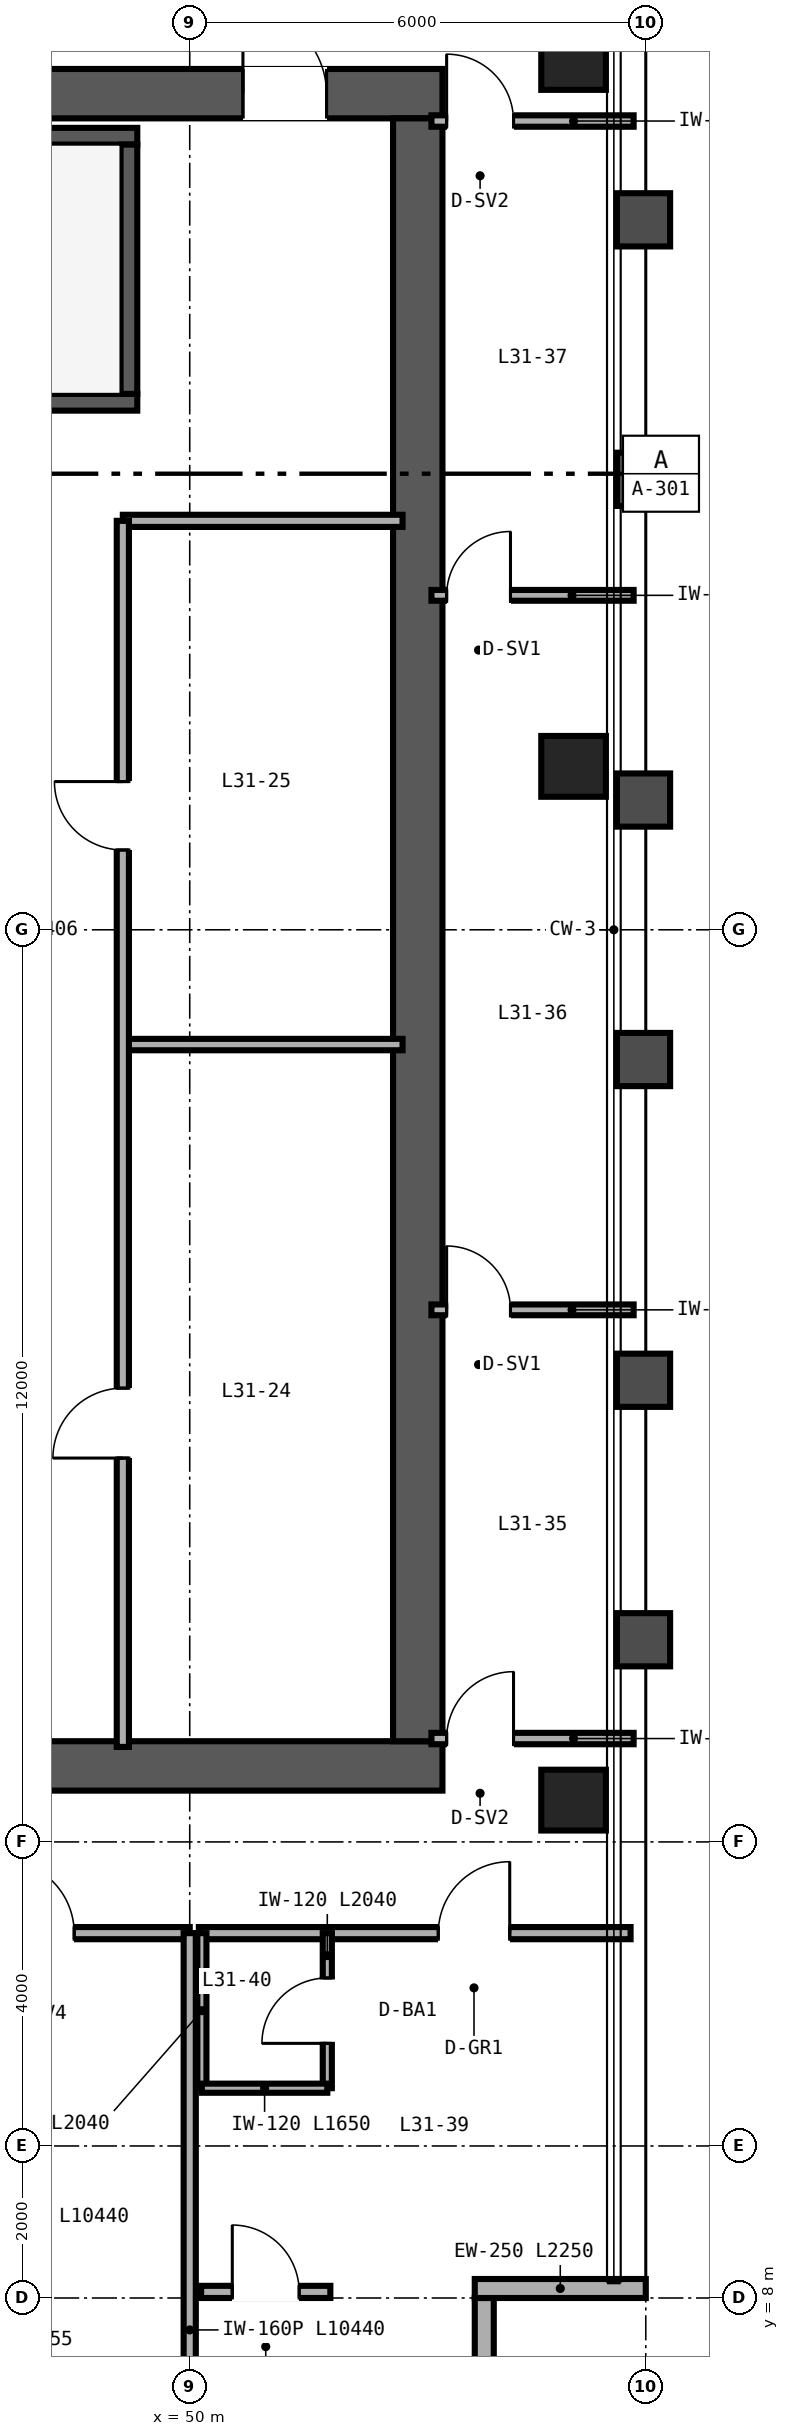
"""IFC4 building model, lengths in metres.
Left out: names, types, materials, properties, quantities, classifications, styles, units other than length and angle.
Written with IfcOpenShell. Run it as: python <this file> out.ifc"""

import sys

from ifc_helpers import new_model, si_unit, direction, frame, frame_2d, origin, origin_2d, place, context, subcontext, project, spatial, rectangle, hollow_rectangle, extrude, source, transform, mapped, element, fill, save


model = new_model("IFC4")
c1 = context("Model", 3, precision=1e-05, world=origin(), true_north=direction((0.0, 1.0)))
c2 = subcontext(c1, "Body", "Model", "MODEL_VIEW")
j1 = project(units=[si_unit("LENGTHUNIT", "METRE"), si_unit("PLANEANGLEUNIT", "RADIAN")], contexts=[c1])
p1 = place(None, origin())
s1 = spatial("IfcSite", under=j1, at=p1, CompositionType="ELEMENT")
p2 = place(p1, origin())
s2 = spatial("IfcBuilding", under=s1, at=p2, CompositionType="ELEMENT")
p3 = place(p2, frame((0.0, 0.0, 126.0)))
s3 = spatial("IfcBuildingStorey", under=s2, at=p3, CompositionType="ELEMENT", Elevation=126.0)
p4 = place(p3, frame((40.675, 15.0, 0.0), z_axis=(0.0, 0.0, 1.0), x_axis=(1.0, 0.0, 0.0)))
e1 = element("IfcWall", 1, at=p4, inside=s3, PredefinedType="SHEAR", context=c2, shape_type="SweptSolid", body=[
    extrude(rectangle(XDim=12.65, YDim=0.65, at=frame_2d((6.325, 0.0))), origin(), (0.0, 0.0, 1.0), 3.36),
])
p5 = place(p4, frame((4.425, 0.0, 0.0)))
e2 = element("IfcOpeningElement", 2, at=p5, cuts=e1, PredefinedType="OPENING", context=c2, shape_type="SweptSolid", body=[
    extrude(rectangle(XDim=1.0, YDim=2.15, at=frame_2d((0.5, 1.075))), frame((0.0, 0.335, 0.0), z_axis=(0.0, -1.0, 0.0), x_axis=(1.0, 0.0, 0.0)), (0.0, 0.0, 1.0), 0.67),
])
p6 = place(p3, frame((40.675, 37.0, 0.0), z_axis=(0.0, 0.0, 1.0), x_axis=(1.0, 0.0, 0.0)))
e3 = element("IfcWall", 3, at=p6, inside=s3, PredefinedType="SHEAR", context=c2, shape_type="SweptSolid", body=[
    extrude(rectangle(XDim=12.65, YDim=0.65, at=frame_2d((6.325, 0.0))), origin(), (0.0, 0.0, 1.0), 3.36),
])
p7 = place(p6, frame((10.025, 0.0, 0.0)))
e4 = element("IfcOpeningElement", 4, at=p7, cuts=e3, PredefinedType="OPENING", context=c2, shape_type="SweptSolid", body=[
    extrude(rectangle(XDim=1.1, YDim=2.15, at=frame_2d((0.55, 1.075))), frame((0.0, 0.335, 0.0), z_axis=(0.0, -1.0, 0.0), x_axis=(1.0, 0.0, 0.0)), (0.0, 0.0, 1.0), 0.67),
])
p8 = place(p3, frame((53.0, 15.325, 0.0), z_axis=(0.0, 0.0, 1.0), x_axis=(0.0, 1.0, 0.0)))
e5 = element("IfcWall", 5, at=p8, inside=s3, PredefinedType="SHEAR", context=c2, shape_type="SweptSolid", body=[
    extrude(rectangle(XDim=21.35, YDim=0.65, at=frame_2d((10.675, 0.0))), origin(), (0.0, 0.0, 1.0), 3.36),
])
p9 = place(p3, frame((41.325, 32.94, 0.0), z_axis=(0.0, 0.0, 1.0), x_axis=(1.0, 0.0, 0.0)))
e6 = element("IfcWall", 6, at=p9, inside=s3, PredefinedType="SHEAR", context=c2, shape_type="SweptSolid", body=[
    extrude(rectangle(XDim=7.985, YDim=0.22, at=frame_2d((3.993, 0.0))), origin(), (0.0, 0.0, 1.0), 3.4),
])
p10 = place(p9, frame((0.595, 0.0, 0.0)))
e7 = element("IfcOpeningElement", 7, at=p10, cuts=e6, PredefinedType="OPENING", context=c2, shape_type="SweptSolid", body=[
    extrude(rectangle(XDim=1.05, YDim=2.15, at=frame_2d((0.525, 1.075))), frame((0.0, 0.12, 0.0), z_axis=(0.0, -1.0, 0.0), x_axis=(1.0, 0.0, 0.0)), (0.0, 0.0, 1.0), 0.24),
])
p11 = place(p3, frame((41.325, 36.44, 0.0), z_axis=(0.0, 0.0, 1.0), x_axis=(1.0, 0.0, 0.0)))
e8 = element("IfcWall", 8, at=p11, inside=s3, PredefinedType="SHEAR", context=c2, shape_type="SweptSolid", body=[
    extrude(rectangle(XDim=7.985, YDim=0.22, at=frame_2d((3.993, 0.0))), origin(), (0.0, 0.0, 1.0), 3.4),
])
p12 = place(p3, frame((49.2, 33.05, 0.0), z_axis=(0.0, 0.0, 1.0), x_axis=(0.0, 1.0, 0.0)))
e9 = element("IfcWall", 9, at=p12, inside=s3, PredefinedType="SHEAR", context=c2, shape_type="SweptSolid", body=[
    extrude(rectangle(XDim=3.28, YDim=0.22, at=frame_2d((1.64, 0.0))), origin(), (0.0, 0.0, 1.0), 3.4),
])
m1 = source(origin(), c2, "Body", "SweptSolid", [
    extrude(hollow_rectangle(XDim=0.85, YDim=0.8, WallThickness=0.032, at=origin_2d()), origin(), (0.0, 0.0, 1.0), 3.36),
])
for number, where, z_axis, x_axis in (
    (10, (55.05, 14.55, 0.0), (0.0, 0.0, 1.0), (1.0, 0.0, 0.0)),
    (11, (55.05, 28.15, 0.0), (0.0, 0.0, 1.0), (1.0, 0.0, 0.0)),
    (12, (55.05, 37.45, 0.0), (0.0, 0.0, 1.0), (1.0, 0.0, 0.0)),
):
    element("IfcColumn", number, at=place(p3, frame(where, z_axis=z_axis, x_axis=x_axis)), inside=s3, PredefinedType="COLUMN", context=c2, shape_type="MappedRepresentation", body=[
        mapped(m1, transform((0.0, 0.0, 0.0), scale=1.0)),
    ])
p13 = place(p3, frame((53.875, 6.0, 0.0), z_axis=(0.0, 0.0, 1.0), x_axis=(0.0, 1.0, 0.0)))
e13 = element("IfcWall", 13, at=p13, inside=s3, PredefinedType="SOLIDWALL", context=c2, shape_type="SweptSolid", body=[
    extrude(rectangle(XDim=2.0, YDim=0.25, at=frame_2d((1.0, 0.0))), origin(), (0.0, 0.0, 1.0), 3.36),
])
p14 = place(p3, frame((53.75, 8.125, 0.0), z_axis=(0.0, 0.0, 1.0), x_axis=(1.0, 0.0, 0.0)))
e14 = element("IfcWall", 14, at=p14, inside=s3, PredefinedType="SOLIDWALL", context=c2, shape_type="SweptSolid", body=[
    extrude(rectangle(XDim=2.25, YDim=0.25, at=frame_2d((1.125, 0.0))), origin(), (0.0, 0.0, 1.0), 3.36),
])
p15 = place(p3, frame((49.12, 31.38, 0.0), z_axis=(0.0, 0.0, 1.0), x_axis=(1.0, 0.0, 0.0)))
e15 = element("IfcWall", 15, at=p15, inside=s3, PredefinedType="PARTITIONING", context=c2, shape_type="SweptSolid", body=[
    extrude(rectangle(XDim=3.68, YDim=0.16, at=frame_2d((1.84, 0.0))), origin(), (0.0, 0.0, 1.0), 2.36),
])
p16 = place(p3, frame((49.12, 24.49, 0.0), z_axis=(0.0, 0.0, 1.0), x_axis=(1.0, 0.0, 0.0)))
e16 = element("IfcWall", 16, at=p16, inside=s3, PredefinedType="PARTITIONING", context=c2, shape_type="SweptSolid", body=[
    extrude(rectangle(XDim=3.68, YDim=0.15, at=frame_2d((1.84, 0.0))), origin(), (0.0, 0.0, 1.0), 3.36),
])
p17 = place(p3, frame((49.12, 15.25, 0.0), z_axis=(0.0, 0.0, 1.0), x_axis=(0.0, 1.0, 0.0)))
e17 = element("IfcWall", 17, at=p17, inside=s3, PredefinedType="PARTITIONING", context=c2, shape_type="SweptSolid", body=[
    extrude(rectangle(XDim=16.13, YDim=0.16, at=frame_2d((8.065, 0.0))), origin(), (0.0, 0.0, 1.0), 2.36),
])
p18 = place(p17, frame((3.8, 0.0, 0.0)))
e18 = element("IfcOpeningElement", 18, at=p18, cuts=e17, PredefinedType="OPENING", context=c2, shape_type="SweptSolid", body=[
    extrude(rectangle(XDim=0.92, YDim=2.15, at=frame_2d((0.46, 1.075))), frame((0.0, 0.09, 0.0), z_axis=(0.0, -1.0, 0.0), x_axis=(1.0, 0.0, 0.0)), (0.0, 0.0, 1.0), 0.18),
])
p19 = place(p17, frame((11.8, 0.0, 0.0)))
e19 = element("IfcOpeningElement", 19, at=p19, cuts=e17, PredefinedType="OPENING", context=c2, shape_type="SweptSolid", body=[
    extrude(rectangle(XDim=0.9, YDim=2.15, at=frame_2d((0.45, 1.075))), frame((0.0, 0.09, 0.0), z_axis=(0.0, -1.0, 0.0), x_axis=(1.0, 0.0, 0.0)), (0.0, 0.0, 1.0), 0.18),
])
p20 = place(p3, frame((53.18, 15.36, 0.0), z_axis=(0.0, 0.0, 1.0), x_axis=(1.0, 0.0, 0.0)))
e20 = element("IfcWall", 20, at=p20, inside=s3, PredefinedType="PARTITIONING", context=c2, shape_type="SweptSolid", body=[
    extrude(rectangle(XDim=2.66, YDim=0.15, at=frame_2d((1.33, 0.0))), origin(), (0.0, 0.0, 1.0), 2.581),
])
p21 = place(p20, frame((0.2, 0.0, 0.0)))
e21 = element("IfcOpeningElement", 21, at=p21, cuts=e20, PredefinedType="OPENING", context=c2, shape_type="SweptSolid", body=[
    extrude(rectangle(XDim=0.88, YDim=2.15, at=frame_2d((0.44, 1.075))), frame((0.0, 0.085, 0.0), z_axis=(0.0, -1.0, 0.0), x_axis=(1.0, 0.0, 0.0)), (0.0, 0.0, 1.0), 0.17),
])
p22 = place(p3, frame((53.18, 36.64, 0.0), z_axis=(0.0, 0.0, 1.0), x_axis=(1.0, 0.0, 0.0)))
e22 = element("IfcWall", 22, at=p22, inside=s3, PredefinedType="PARTITIONING", context=c2, shape_type="SweptSolid", body=[
    extrude(rectangle(XDim=2.66, YDim=0.15, at=frame_2d((1.33, 0.0))), origin(), (0.0, 0.0, 1.0), 2.743),
])
p23 = place(p22, frame((0.2, 0.0, 0.0)))
e23 = element("IfcOpeningElement", 23, at=p23, cuts=e22, PredefinedType="OPENING", context=c2, shape_type="SweptSolid", body=[
    extrude(rectangle(XDim=0.88, YDim=2.15, at=frame_2d((0.44, 1.075))), frame((0.0, 0.085, 0.0), z_axis=(0.0, -1.0, 0.0), x_axis=(1.0, 0.0, 0.0)), (0.0, 0.0, 1.0), 0.17),
])
p24 = place(p3, frame((53.18, 21.0, 0.0), z_axis=(0.0, 0.0, 1.0), x_axis=(1.0, 0.0, 0.0)))
e24 = element("IfcWall", 24, at=p24, inside=s3, PredefinedType="PARTITIONING", context=c2, shape_type="SweptSolid", body=[
    extrude(rectangle(XDim=2.66, YDim=0.142, at=frame_2d((1.33, 0.0))), origin(), (0.0, 0.0, 1.0), 2.581),
])
p25 = place(p24, frame((0.2, 0.0, 0.0)))
e25 = element("IfcOpeningElement", 25, at=p25, cuts=e24, PredefinedType="OPENING", context=c2, shape_type="SweptSolid", body=[
    extrude(rectangle(XDim=0.84, YDim=2.1, at=frame_2d((0.42, 1.05))), frame((0.0, 0.081, 0.0), z_axis=(0.0, -1.0, 0.0), x_axis=(1.0, 0.0, 0.0)), (0.0, 0.0, 1.0), 0.162),
])
p26 = place(p3, frame((53.18, 30.4, 0.0), z_axis=(0.0, 0.0, 1.0), x_axis=(1.0, 0.0, 0.0)))
e26 = element("IfcWall", 26, at=p26, inside=s3, PredefinedType="PARTITIONING", context=c2, shape_type="SweptSolid", body=[
    extrude(rectangle(XDim=2.66, YDim=0.142, at=frame_2d((1.33, 0.0))), origin(), (0.0, 0.0, 1.0), 2.743),
])
p27 = place(p26, frame((0.2, 0.0, 0.0)))
e27 = element("IfcOpeningElement", 27, at=p27, cuts=e26, PredefinedType="OPENING", context=c2, shape_type="SweptSolid", body=[
    extrude(rectangle(XDim=0.84, YDim=2.1, at=frame_2d((0.42, 1.05))), frame((0.0, 0.081, 0.0), z_axis=(0.0, -1.0, 0.0), x_axis=(1.0, 0.0, 0.0)), (0.0, 0.0, 1.0), 0.162),
])
p28 = place(p3, frame((50.12, 12.8, 0.0), z_axis=(0.0, 0.0, 1.0), x_axis=(1.0, 0.0, 0.0)))
e28 = element("IfcWall", 28, at=p28, inside=s3, PredefinedType="PARTITIONING", context=c2, shape_type="SweptSolid", body=[
    extrude(rectangle(XDim=5.68, YDim=0.16, at=frame_2d((2.84, 0.0))), origin(), (0.0, 0.0, 1.0), 3.36),
])
p29 = place(p28, frame((3.15, 0.0, 0.0)))
e29 = element("IfcOpeningElement", 29, at=p29, cuts=e28, PredefinedType="OPENING", context=c2, shape_type="SweptSolid", body=[
    extrude(rectangle(XDim=0.94, YDim=2.15, at=frame_2d((0.47, 1.075))), frame((0.0, 0.09, 0.0), z_axis=(0.0, -1.0, 0.0), x_axis=(1.0, 0.0, 0.0)), (0.0, 0.0, 1.0), 0.18),
])
p30 = place(p3, frame((51.81, 10.76, 0.0), z_axis=(0.0, 0.0, 1.0), x_axis=(0.0, 1.0, 0.0)))
e30 = element("IfcWall", 30, at=p30, inside=s3, PredefinedType="PARTITIONING", context=c2, shape_type="SweptSolid", body=[
    extrude(rectangle(XDim=2.04, YDim=0.12, at=frame_2d((1.02, 0.0))), origin(), (0.0, 0.0, 1.0), 3.36),
])
p31 = place(p30, frame((0.59, 0.0, 0.0)))
e31 = element("IfcOpeningElement", 31, at=p31, cuts=e30, PredefinedType="OPENING", context=c2, shape_type="SweptSolid", body=[
    extrude(rectangle(XDim=0.86, YDim=2.1, at=frame_2d((0.43, 1.05))), frame((0.0, 0.07, 0.0), z_axis=(0.0, -1.0, 0.0), x_axis=(1.0, 0.0, 0.0)), (0.0, 0.0, 1.0), 0.14),
])
p32 = place(p3, frame((50.16, 10.76, 0.0), z_axis=(0.0, 0.0, 1.0), x_axis=(0.0, 1.0, 0.0)))
e32 = element("IfcWall", 32, at=p32, inside=s3, PredefinedType="PARTITIONING", context=c2, shape_type="SweptSolid", body=[
    extrude(rectangle(XDim=2.04, YDim=0.12, at=frame_2d((1.02, 0.0))), origin(), (0.0, 0.0, 1.0), 3.36),
])
p33 = place(p3, frame((50.16, 10.76, 0.0), z_axis=(0.0, 0.0, 1.0), x_axis=(1.0, 0.0, 0.0)))
e33 = element("IfcWall", 33, at=p33, inside=s3, PredefinedType="PARTITIONING", context=c2, shape_type="SweptSolid", body=[
    extrude(rectangle(XDim=1.65, YDim=0.12, at=frame_2d((0.825, 0.0))), origin(), (0.0, 0.0, 1.0), 3.36),
])
p34 = place(p3, frame((50.15, 8.08, 0.0), z_axis=(0.0, 0.0, 1.0), x_axis=(1.0, 0.0, 0.0)))
e34 = element("IfcWall", 34, at=p34, inside=s3, PredefinedType="PARTITIONING", context=c2, shape_type="SweptSolid", body=[
    extrude(rectangle(XDim=1.7, YDim=0.16, at=frame_2d((0.85, 0.0))), origin(), (0.0, 0.0, 1.0), 3.36),
])
p35 = place(p34, frame((0.41, 0.0, 0.0)))
e35 = element("IfcOpeningElement", 35, at=p35, cuts=e34, PredefinedType="OPENING", context=c2, shape_type="SweptSolid", body=[
    extrude(rectangle(XDim=0.88, YDim=2.15, at=frame_2d((0.44, 1.075))), frame((0.0, 0.09, 0.0), z_axis=(0.0, -1.0, 0.0), x_axis=(1.0, 0.0, 0.0)), (0.0, 0.0, 1.0), 0.18),
])
p36 = place(p3, frame((14.0, 12.8, 0.0), z_axis=(0.0, 0.0, 1.0), x_axis=(1.0, 0.0, 0.0)))
e36 = element("IfcWall", 36, at=p36, inside=s3, PredefinedType="PARTITIONING", context=c2, shape_type="SweptSolid", body=[
    extrude(rectangle(XDim=36.0, YDim=0.16, at=frame_2d((18.0, 0.0))), origin(), (0.0, 0.0, 1.0), 2.581),
])
p37 = place(p36, frame((4.14, 0.0, 0.0)))
e37 = element("IfcOpeningElement", 37, at=p37, cuts=e36, PredefinedType="OPENING", context=c2, shape_type="SweptSolid", body=[
    extrude(rectangle(XDim=0.94, YDim=2.15, at=frame_2d((0.47, 1.075))), frame((0.0, 0.09, 0.0), z_axis=(0.0, -1.0, 0.0), x_axis=(1.0, 0.0, 0.0)), (0.0, 0.0, 1.0), 0.18),
])
p38 = place(p36, frame((9.54, 0.0, 0.0)))
e38 = element("IfcOpeningElement", 38, at=p38, cuts=e36, PredefinedType="OPENING", context=c2, shape_type="SweptSolid", body=[
    extrude(rectangle(XDim=0.94, YDim=2.15, at=frame_2d((0.47, 1.075))), frame((0.0, 0.09, 0.0), z_axis=(0.0, -1.0, 0.0), x_axis=(1.0, 0.0, 0.0)), (0.0, 0.0, 1.0), 0.18),
])
p39 = place(p36, frame((13.22, 0.0, 0.0)))
e39 = element("IfcOpeningElement", 39, at=p39, cuts=e36, PredefinedType="OPENING", context=c2, shape_type="SweptSolid", body=[
    extrude(rectangle(XDim=0.96, YDim=2.15, at=frame_2d((0.48, 1.075))), frame((0.0, 0.09, 0.0), z_axis=(0.0, -1.0, 0.0), x_axis=(1.0, 0.0, 0.0)), (0.0, 0.0, 1.0), 0.18),
])
p40 = place(p36, frame((19.02, 0.0, 0.0)))
e40 = element("IfcOpeningElement", 40, at=p40, cuts=e36, PredefinedType="OPENING", context=c2, shape_type="SweptSolid", body=[
    extrude(rectangle(XDim=0.96, YDim=2.15, at=frame_2d((0.48, 1.075))), frame((0.0, 0.09, 0.0), z_axis=(0.0, -1.0, 0.0), x_axis=(1.0, 0.0, 0.0)), (0.0, 0.0, 1.0), 0.18),
])
p41 = place(p36, frame((24.62, 0.0, 0.0)))
e41 = element("IfcOpeningElement", 41, at=p41, cuts=e36, PredefinedType="OPENING", context=c2, shape_type="SweptSolid", body=[
    extrude(rectangle(XDim=0.96, YDim=2.15, at=frame_2d((0.48, 1.075))), frame((0.0, 0.09, 0.0), z_axis=(0.0, -1.0, 0.0), x_axis=(1.0, 0.0, 0.0)), (0.0, 0.0, 1.0), 0.18),
])
p42 = place(p36, frame((30.74, 0.0, 0.0)))
e42 = element("IfcOpeningElement", 42, at=p42, cuts=e36, PredefinedType="OPENING", context=c2, shape_type="SweptSolid", body=[
    extrude(rectangle(XDim=0.94, YDim=2.15, at=frame_2d((0.47, 1.075))), frame((0.0, 0.09, 0.0), z_axis=(0.0, -1.0, 0.0), x_axis=(1.0, 0.0, 0.0)), (0.0, 0.0, 1.0), 0.18),
])
p43 = place(p36, frame((33.52, 0.0, 0.0)))
e43 = element("IfcOpeningElement", 43, at=p43, cuts=e36, PredefinedType="OPENING", context=c2, shape_type="SweptSolid", body=[
    extrude(rectangle(XDim=0.96, YDim=2.15, at=frame_2d((0.48, 1.075))), frame((0.0, 0.09, 0.0), z_axis=(0.0, -1.0, 0.0), x_axis=(1.0, 0.0, 0.0)), (0.0, 0.0, 1.0), 0.18),
])
p44 = place(p3, frame((50.0, 2.36, 0.0), z_axis=(0.0, 0.0, 1.0), x_axis=(0.0, 1.0, 0.0)))
e44 = element("IfcWall", 44, at=p44, inside=s3, PredefinedType="PARTITIONING", context=c2, shape_type="SweptSolid", body=[
    extrude(rectangle(XDim=10.44, YDim=0.16, at=frame_2d((5.22, 0.0))), origin(), (0.0, 0.0, 1.0), 2.667),
])
m2 = source(origin(), c2, "Body", "SweptSolid", [
    extrude(rectangle(XDim=1.1, YDim=2.15, at=frame_2d((0.55, 1.075))), frame((0.0, 0.025, 0.0), z_axis=(0.0, -1.0, 0.0), x_axis=(1.0, 0.0, 0.0)), (0.0, 0.0, 1.0), 0.05),
])
p45 = place(p7, origin())
e45 = element("IfcDoor", 45, at=p45, inside=s3, OperationType="SINGLE_SWING_LEFT", PredefinedType="DOOR", context=c2, shape_type="MappedRepresentation", body=[
    mapped(m2, transform((0.0, 0.0, 0.0), scale=1.0)),
])
fill(e4, e45)
m3 = source(origin(), c2, "Body", "SweptSolid", [
    extrude(rectangle(XDim=0.92, YDim=2.15, at=frame_2d((0.46, 1.075))), frame((0.0, 0.025, 0.0), z_axis=(0.0, -1.0, 0.0), x_axis=(1.0, 0.0, 0.0)), (0.0, 0.0, 1.0), 0.05),
])
p46 = place(p18, origin())
e46 = element("IfcDoor", 46, at=p46, inside=s3, OperationType="SINGLE_SWING_LEFT", PredefinedType="DOOR", context=c2, shape_type="MappedRepresentation", body=[
    mapped(m3, transform((0.0, 0.0, 0.0), scale=1.0)),
])
fill(e18, e46)
m4 = source(origin(), c2, "Body", "SweptSolid", [
    extrude(rectangle(XDim=0.9, YDim=2.15, at=frame_2d((0.45, 1.075))), frame((0.0, 0.025, 0.0), z_axis=(0.0, -1.0, 0.0), x_axis=(1.0, 0.0, 0.0)), (0.0, 0.0, 1.0), 0.05),
])
p47 = place(p19, origin())
e47 = element("IfcDoor", 47, at=p47, inside=s3, OperationType="SINGLE_SWING_RIGHT", PredefinedType="DOOR", context=c2, shape_type="MappedRepresentation", body=[
    mapped(m4, transform((0.0, 0.0, 0.0), scale=1.0)),
])
fill(e19, e47)
m5 = source(origin(), c2, "Body", "SweptSolid", [
    extrude(rectangle(XDim=0.88, YDim=2.15, at=frame_2d((0.44, 1.075))), frame((0.0, 0.025, 0.0), z_axis=(0.0, -1.0, 0.0), x_axis=(1.0, 0.0, 0.0)), (0.0, 0.0, 1.0), 0.05),
])
p48 = place(p21, origin())
e48 = element("IfcDoor", 48, at=p48, inside=s3, OperationType="SINGLE_SWING_RIGHT", PredefinedType="DOOR", context=c2, shape_type="MappedRepresentation", body=[
    mapped(m5, transform((0.0, 0.0, 0.0), scale=1.0)),
])
fill(e21, e48)
p49 = place(p23, origin())
e49 = element("IfcDoor", 49, at=p49, inside=s3, OperationType="SINGLE_SWING_LEFT", PredefinedType="DOOR", context=c2, shape_type="MappedRepresentation", body=[
    mapped(m5, transform((0.0, 0.0, 0.0), scale=1.0)),
])
fill(e23, e49)
m6 = source(origin(), c2, "Body", "SweptSolid", [
    extrude(rectangle(XDim=0.84, YDim=2.1, at=frame_2d((0.42, 1.05))), frame((0.0, 0.025, 0.0), z_axis=(0.0, -1.0, 0.0), x_axis=(1.0, 0.0, 0.0)), (0.0, 0.0, 1.0), 0.05),
])
p50 = place(p25, origin())
e50 = element("IfcDoor", 50, at=p50, inside=s3, OperationType="SINGLE_SWING_LEFT", PredefinedType="DOOR", context=c2, shape_type="MappedRepresentation", body=[
    mapped(m6, transform((0.0, 0.0, 0.0), scale=1.0)),
])
fill(e25, e50)
p51 = place(p27, origin())
e51 = element("IfcDoor", 51, at=p51, inside=s3, OperationType="SINGLE_SWING_RIGHT", PredefinedType="DOOR", context=c2, shape_type="MappedRepresentation", body=[
    mapped(m6, transform((0.0, 0.0, 0.0), scale=1.0)),
])
fill(e27, e51)
m7 = source(origin(), c2, "Body", "SweptSolid", [
    extrude(rectangle(XDim=0.86, YDim=2.1, at=frame_2d((0.43, 1.05))), frame((0.0, 0.025, 0.0), z_axis=(0.0, -1.0, 0.0), x_axis=(1.0, 0.0, 0.0)), (0.0, 0.0, 1.0), 0.05),
])
p52 = place(p31, origin())
e52 = element("IfcDoor", 52, at=p52, inside=s3, OperationType="SINGLE_SWING_LEFT", PredefinedType="DOOR", context=c2, shape_type="MappedRepresentation", body=[
    mapped(m7, transform((0.0, 0.0, 0.0), scale=1.0)),
])
fill(e31, e52)
m8 = source(origin(), c2, "Body", "SweptSolid", [
    extrude(rectangle(XDim=0.94, YDim=2.15, at=frame_2d((0.47, 1.075))), frame((0.0, 0.025, 0.0), z_axis=(0.0, -1.0, 0.0), x_axis=(1.0, 0.0, 0.0)), (0.0, 0.0, 1.0), 0.05),
])
p53 = place(p29, origin())
e53 = element("IfcDoor", 53, at=p53, inside=s3, OperationType="SINGLE_SWING_RIGHT", PredefinedType="DOOR", context=c2, shape_type="MappedRepresentation", body=[
    mapped(m8, transform((0.0, 0.0, 0.0), scale=1.0)),
])
fill(e29, e53)
p54 = place(p35, origin())
e54 = element("IfcDoor", 54, at=p54, inside=s3, OperationType="SINGLE_SWING_LEFT", PredefinedType="DOOR", context=c2, shape_type="MappedRepresentation", body=[
    mapped(m5, transform((0.0, 0.0, 0.0), scale=1.0)),
])
fill(e35, e54)
m9 = source(origin(), c2, "Body", "SweptSolid", [
    extrude(rectangle(XDim=0.96, YDim=2.15, at=frame_2d((0.48, 1.075))), frame((0.0, 0.025, 0.0), z_axis=(0.0, -1.0, 0.0), x_axis=(1.0, 0.0, 0.0)), (0.0, 0.0, 1.0), 0.05),
])
p55 = place(p43, origin())
e55 = element("IfcDoor", 55, at=p55, inside=s3, OperationType="SINGLE_SWING_LEFT", PredefinedType="DOOR", context=c2, shape_type="MappedRepresentation", body=[
    mapped(m9, transform((0.0, 0.0, 0.0), scale=1.0)),
])
fill(e43, e55)
save(model, sys.argv[1])
